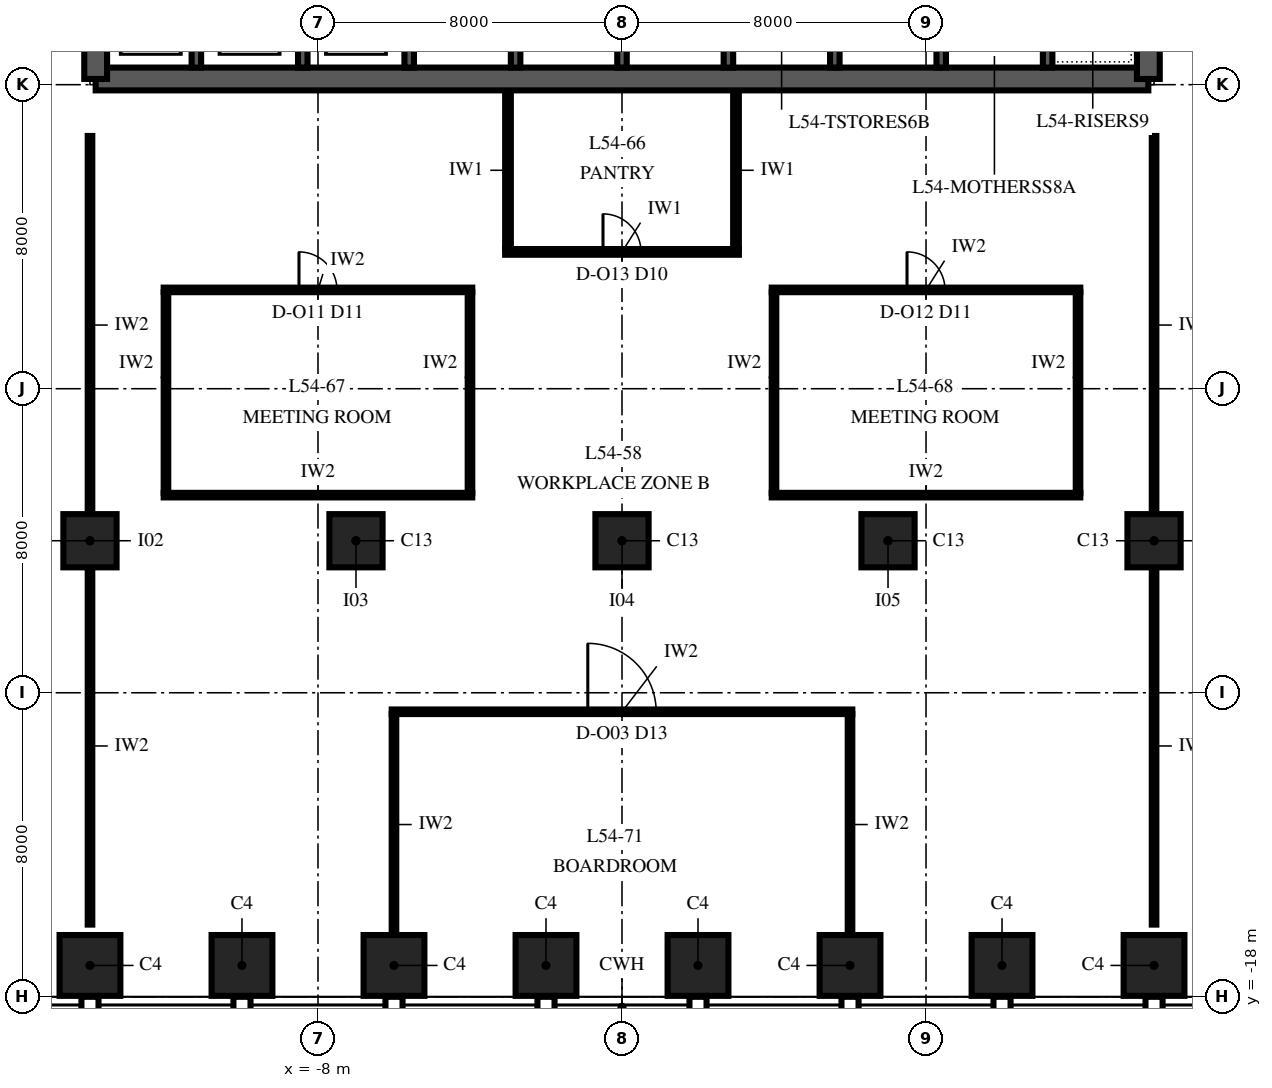
"""IFC4 building model, lengths in metres.
Left out: names, types, materials, properties, quantities, classifications, styles, units other than length and angle.
Written with IfcOpenShell. Run it as: python <this file> out.ifc"""

import sys

from ifc_helpers import new_model, si_unit, direction, frame, frame_2d, origin, origin_2d, place, context, subcontext, project, spatial, polyline, rectangle, outline, extrude, element, fill, save


model = new_model("IFC4")
c1 = context("Model", 3, precision=1e-05, world=origin(), true_north=direction((0.0, 1.0)))
c2 = subcontext(c1, "Body", "Model", "MODEL_VIEW")
j1 = project(units=[si_unit("LENGTHUNIT", "METRE"), si_unit("PLANEANGLEUNIT", "RADIAN")], contexts=[c1])
p1 = place(None, origin())
s1 = spatial("IfcSite", under=j1, at=p1, CompositionType="ELEMENT")
p2 = place(p1, origin())
s2 = spatial("IfcBuilding", under=s1, at=p2, CompositionType="ELEMENT")
p3 = place(p2, frame((0.0, 0.0, 234.0)))
s3 = spatial("IfcBuildingStorey", under=s2, at=p3, CompositionType="ELEMENT", Elevation=234.0)
for number, where, z_axis, x_axis in (
    (1, (-14.0, -17.175, 0.0), (0.0, 0.0, 1.0), (1.0, 0.0, 0.0)),
    (2, (-10.0, -17.175, 0.0), (0.0, 0.0, 1.0), (1.0, 0.0, 0.0)),
    (3, (-6.0, -17.175, 0.0), (0.0, 0.0, 1.0), (1.0, 0.0, 0.0)),
    (4, (-2.0, -17.175, 0.0), (0.0, 0.0, 1.0), (1.0, 0.0, 0.0)),
    (5, (2.0, -17.175, 0.0), (0.0, 0.0, 1.0), (1.0, 0.0, 0.0)),
    (6, (6.0, -17.175, 0.0), (0.0, 0.0, 1.0), (1.0, 0.0, 0.0)),
    (7, (10.0, -17.175, 0.0), (0.0, 0.0, 1.0), (1.0, 0.0, 0.0)),
    (8, (14.0, -17.175, 0.0), (0.0, 0.0, 1.0), (1.0, 0.0, 0.0)),
):
    element("IfcColumn", number, at=place(p3, frame(where, z_axis=z_axis, x_axis=x_axis)), inside=s3, PredefinedType="COLUMN", context=c2, shape_type="SweptSolid", body=[
        extrude(rectangle(XDim=1.6, YDim=1.6, at=origin_2d()), origin(), (0.0, 0.0, 1.0), 4.0),
    ])
for number, where, z_axis, x_axis in (
    (9, (-14.0, -6.0, 0.0), (0.0, 0.0, 1.0), (1.0, 0.0, 0.0)),
    (10, (-7.0, -6.0, 0.0), (0.0, 0.0, 1.0), (1.0, 0.0, 0.0)),
    (11, (0.0, -6.0, 0.0), (0.0, 0.0, 1.0), (1.0, 0.0, 0.0)),
    (12, (7.0, -6.0, 0.0), (0.0, 0.0, 1.0), (1.0, 0.0, 0.0)),
    (13, (14.0, -6.0, 0.0), (0.0, 0.0, 1.0), (1.0, 0.0, 0.0)),
):
    element("IfcColumn", number, at=place(p3, frame(where, z_axis=z_axis, x_axis=x_axis)), inside=s3, PredefinedType="COLUMN", context=c2, shape_type="SweptSolid", body=[
        extrude(rectangle(XDim=1.4, YDim=1.4, at=origin_2d()), origin(), (0.0, 0.0, 1.0), 4.0),
    ])
p4 = place(p3, frame((-13.85, 6.15, 0.0), z_axis=(0.0, 0.0, 1.0), x_axis=(1.0, 0.0, 0.0)))
e14 = element("IfcWall", 14, at=p4, inside=s3, PredefinedType="SHEAR", context=c2, shape_type="SweptSolid", body=[
    extrude(rectangle(XDim=27.7, YDim=0.6, at=frame_2d((13.85, 0.0))), origin(), (0.0, 0.0, 1.0), 4.0),
])
p5 = place(p3, frame((13.85, 6.15, 0.0), z_axis=(0.0, 0.0, 1.0), x_axis=(0.0, 1.0, 0.0)))
e15 = element("IfcWall", 15, at=p5, inside=s3, PredefinedType="SHEAR", context=c2, shape_type="SweptSolid", body=[
    extrude(outline(polyline([(0.0, -0.3), (17.7, -0.3), (17.7, 0.0), (17.4, 0.0), (17.4, 0.3), (0.3, 0.3), (0.3, 0.0), (0.0, 0.0), (0.0, -0.3)])), origin(), (0.0, 0.0, 1.0), 4.0),
])
p6 = place(p5, frame((4.15, 0.0, 0.0)))
e16 = element("IfcOpeningElement", 16, at=p6, cuts=e15, PredefinedType="OPENING", context=c2, shape_type="SweptSolid", body=[
    extrude(rectangle(XDim=1.8, YDim=2.4, at=frame_2d((0.9, 1.2))), frame((0.0, 0.315, 0.0), z_axis=(0.0, -1.0, 0.0), x_axis=(1.0, 0.0, 0.0)), (0.0, 0.0, 1.0), 0.63),
])
p7 = place(p3, frame((-13.85, 23.85, 0.0), z_axis=(0.0, 0.0, 1.0), x_axis=(0.0, -1.0, 0.0)))
e17 = element("IfcWall", 17, at=p7, inside=s3, PredefinedType="SHEAR", context=c2, shape_type="SweptSolid", body=[
    extrude(outline(polyline([(0.0, -0.3), (17.7, -0.3), (17.7, 0.0), (17.4, 0.0), (17.4, 0.3), (0.3, 0.3), (0.3, 0.0), (0.0, 0.0), (0.0, -0.3)])), origin(), (0.0, 0.0, 1.0), 4.0),
])
p8 = place(p7, frame((11.75, 0.0, 0.0)))
e18 = element("IfcOpeningElement", 18, at=p8, cuts=e17, PredefinedType="OPENING", context=c2, shape_type="SweptSolid", body=[
    extrude(rectangle(XDim=1.8, YDim=2.4, at=frame_2d((0.9, 1.2))), frame((0.0, 0.315, 0.0), z_axis=(0.0, -1.0, 0.0), x_axis=(1.0, 0.0, 0.0)), (0.0, 0.0, 1.0), 0.63),
])
for number, where, z_axis, x_axis in (
    (19, (-11.2, 6.45, 0.0), (0.0, 0.0, 1.0), (0.0, 1.0, 0.0)),
    (20, (-8.4, 6.45, 0.0), (0.0, 0.0, 1.0), (0.0, 1.0, 0.0)),
    (21, (-5.6, 6.45, 0.0), (0.0, 0.0, 1.0), (0.0, 1.0, 0.0)),
    (22, (-2.8, 6.45, 0.0), (0.0, 0.0, 1.0), (0.0, 1.0, 0.0)),
    (23, (0.0, 6.45, 0.0), (0.0, 0.0, 1.0), (0.0, 1.0, 0.0)),
    (24, (2.8, 6.45, 0.0), (0.0, 0.0, 1.0), (0.0, 1.0, 0.0)),
    (25, (5.6, 6.45, 0.0), (0.0, 0.0, 1.0), (0.0, 1.0, 0.0)),
    (26, (8.4, 6.45, 0.0), (0.0, 0.0, 1.0), (0.0, 1.0, 0.0)),
    (27, (11.2, 6.45, 0.0), (0.0, 0.0, 1.0), (0.0, 1.0, 0.0)),
):
    element("IfcWall", number, at=place(p3, frame(where, z_axis=z_axis, x_axis=x_axis)), inside=s3, PredefinedType="SHEAR", context=c2, shape_type="SweptSolid", body=[
        extrude(rectangle(XDim=2.825, YDim=0.25, at=frame_2d((1.413, 0.0))), origin(), (0.0, 0.0, 1.0), 4.0),
    ])
p9 = place(p3, frame((-6.06, -10.5, 0.0), z_axis=(0.0, 0.0, 1.0), x_axis=(1.0, 0.0, 0.0)))
e28 = element("IfcWall", 28, at=p9, inside=s3, PredefinedType="PARTITIONING", context=c2, shape_type="SweptSolid", body=[
    extrude(rectangle(XDim=12.12, YDim=0.12, at=frame_2d((6.06, 0.0))), origin(), (0.0, 0.0, 1.0), 3.25),
])
p10 = place(p9, frame((5.16, 0.0, 0.0)))
e29 = element("IfcOpeningElement", 29, at=p10, cuts=e28, PredefinedType="OPENING", context=c2, shape_type="SweptSolid", body=[
    extrude(rectangle(XDim=1.8, YDim=2.4, at=frame_2d((0.9, 1.2))), frame((0.0, 0.075, 0.0), z_axis=(0.0, -1.0, 0.0), x_axis=(1.0, 0.0, 0.0)), (0.0, 0.0, 1.0), 0.15),
])
for number, where, z_axis, x_axis in (
    (30, (-12.06, -4.8, 0.0), (0.0, 0.0, 1.0), (1.0, 0.0, 0.0)),
    (31, (3.94, -4.8, 0.0), (0.0, 0.0, 1.0), (1.0, 0.0, 0.0)),
):
    element("IfcWall", number, at=place(p3, frame(where, z_axis=z_axis, x_axis=x_axis)), inside=s3, PredefinedType="PARTITIONING", context=c2, shape_type="SweptSolid", body=[
        extrude(rectangle(XDim=8.12, YDim=0.12, at=frame_2d((4.06, 0.0))), origin(), (0.0, 0.0, 1.0), 3.25),
    ])
p11 = place(p3, frame((-12.06, 0.6, 0.0), z_axis=(0.0, 0.0, 1.0), x_axis=(1.0, 0.0, 0.0)))
e32 = element("IfcWall", 32, at=p11, inside=s3, PredefinedType="PARTITIONING", context=c2, shape_type="SweptSolid", body=[
    extrude(rectangle(XDim=8.12, YDim=0.12, at=frame_2d((4.06, 0.0))), origin(), (0.0, 0.0, 1.0), 3.25),
])
p12 = place(p11, frame((3.56, 0.0, 0.0)))
e33 = element("IfcOpeningElement", 33, at=p12, cuts=e32, PredefinedType="OPENING", context=c2, shape_type="SweptSolid", body=[
    extrude(rectangle(XDim=1.0, YDim=2.4, at=frame_2d((0.5, 1.2))), frame((0.0, 0.075, 0.0), z_axis=(0.0, -1.0, 0.0), x_axis=(1.0, 0.0, 0.0)), (0.0, 0.0, 1.0), 0.15),
])
p13 = place(p3, frame((3.94, 0.6, 0.0), z_axis=(0.0, 0.0, 1.0), x_axis=(1.0, 0.0, 0.0)))
e34 = element("IfcWall", 34, at=p13, inside=s3, PredefinedType="PARTITIONING", context=c2, shape_type="SweptSolid", body=[
    extrude(rectangle(XDim=8.12, YDim=0.12, at=frame_2d((4.06, 0.0))), origin(), (0.0, 0.0, 1.0), 3.25),
])
p14 = place(p13, frame((3.56, 0.0, 0.0)))
e35 = element("IfcOpeningElement", 35, at=p14, cuts=e34, PredefinedType="OPENING", context=c2, shape_type="SweptSolid", body=[
    extrude(rectangle(XDim=1.0, YDim=2.4, at=frame_2d((0.5, 1.2))), frame((0.0, 0.075, 0.0), z_axis=(0.0, -1.0, 0.0), x_axis=(1.0, 0.0, 0.0)), (0.0, 0.0, 1.0), 0.15),
])
p15 = place(p3, frame((-3.075, 1.6, 0.0), z_axis=(0.0, 0.0, 1.0), x_axis=(1.0, 0.0, 0.0)))
e36 = element("IfcWall", 36, at=p15, inside=s3, PredefinedType="PARTITIONING", context=c2, shape_type="SweptSolid", body=[
    extrude(rectangle(XDim=6.15, YDim=0.15, at=frame_2d((3.075, 0.0))), origin(), (0.0, 0.0, 1.0), 3.25),
])
p16 = place(p15, frame((2.575, 0.0, 0.0)))
e37 = element("IfcOpeningElement", 37, at=p16, cuts=e36, PredefinedType="OPENING", context=c2, shape_type="SweptSolid", body=[
    extrude(rectangle(XDim=1.0, YDim=2.3, at=frame_2d((0.5, 1.15))), frame((0.0, 0.09, 0.0), z_axis=(0.0, -1.0, 0.0), x_axis=(1.0, 0.0, 0.0)), (0.0, 0.0, 1.0), 0.18),
])
p17 = place(p3, frame((-12.0, -4.74, 0.0), z_axis=(0.0, 0.0, 1.0), x_axis=(0.0, 1.0, 0.0)))
e38 = element("IfcWall", 38, at=p17, inside=s3, PredefinedType="PARTITIONING", context=c2, shape_type="SweptSolid", body=[
    extrude(rectangle(XDim=5.28, YDim=0.12, at=frame_2d((2.64, 0.0))), origin(), (0.0, 0.0, 1.0), 3.85),
])
p18 = place(p3, frame((-6.0, -16.375, 0.0), z_axis=(0.0, 0.0, 1.0), x_axis=(0.0, 1.0, 0.0)))
e39 = element("IfcWall", 39, at=p18, inside=s3, PredefinedType="PARTITIONING", context=c2, shape_type="SweptSolid", body=[
    extrude(rectangle(XDim=5.815, YDim=0.12, at=frame_2d((2.907, 0.0))), origin(), (0.0, 0.0, 1.0), 3.25),
])
p19 = place(p3, frame((-4.0, -4.74, 0.0), z_axis=(0.0, 0.0, 1.0), x_axis=(0.0, 1.0, 0.0)))
e40 = element("IfcWall", 40, at=p19, inside=s3, PredefinedType="PARTITIONING", context=c2, shape_type="SweptSolid", body=[
    extrude(rectangle(XDim=5.28, YDim=0.12, at=frame_2d((2.64, 0.0))), origin(), (0.0, 0.0, 1.0), 3.85),
])
for number, where, z_axis, x_axis in (
    (41, (-3.0, 1.675, 0.0), (0.0, 0.0, 1.0), (0.0, 1.0, 0.0)),
    (42, (3.0, 1.675, 0.0), (0.0, 0.0, 1.0), (0.0, 1.0, 0.0)),
):
    element("IfcWall", number, at=place(p3, frame(where, z_axis=z_axis, x_axis=x_axis)), inside=s3, PredefinedType="PARTITIONING", context=c2, shape_type="SweptSolid", body=[
        extrude(rectangle(XDim=4.145, YDim=0.15, at=frame_2d((2.073, 0.0))), origin(), (0.0, 0.0, 1.0), 3.85),
    ])
p20 = place(p3, frame((4.0, -4.74, 0.0), z_axis=(0.0, 0.0, 1.0), x_axis=(0.0, 1.0, 0.0)))
e43 = element("IfcWall", 43, at=p20, inside=s3, PredefinedType="PARTITIONING", context=c2, shape_type="SweptSolid", body=[
    extrude(rectangle(XDim=5.28, YDim=0.12, at=frame_2d((2.64, 0.0))), origin(), (0.0, 0.0, 1.0), 3.85),
])
p21 = place(p3, frame((6.0, -16.375, 0.0), z_axis=(0.0, 0.0, 1.0), x_axis=(0.0, 1.0, 0.0)))
e44 = element("IfcWall", 44, at=p21, inside=s3, PredefinedType="PARTITIONING", context=c2, shape_type="SweptSolid", body=[
    extrude(rectangle(XDim=5.815, YDim=0.12, at=frame_2d((2.907, 0.0))), origin(), (0.0, 0.0, 1.0), 3.25),
])
p22 = place(p3, frame((12.0, -4.74, 0.0), z_axis=(0.0, 0.0, 1.0), x_axis=(0.0, 1.0, 0.0)))
e45 = element("IfcWall", 45, at=p22, inside=s3, PredefinedType="PARTITIONING", context=c2, shape_type="SweptSolid", body=[
    extrude(rectangle(XDim=5.28, YDim=0.12, at=frame_2d((2.64, 0.0))), origin(), (0.0, 0.0, 1.0), 3.85),
])
p23 = place(p3, frame((-13.999, -16.1, 0.0), z_axis=(0.0, 0.0, 1.0), x_axis=(0.0, 1.0, 0.0)))
e46 = element("IfcWall", 46, at=p23, inside=s3, PredefinedType="PARTITIONING", context=c2, shape_type="SweptSolid", body=[
    extrude(rectangle(XDim=9.4, YDim=0.12, at=frame_2d((4.7, 0.0))), origin(), (0.0, 0.0, 1.0), 3.25),
])
p24 = place(p3, frame((-13.999, -5.3, 0.0), z_axis=(0.0, 0.0, 1.0), x_axis=(0.0, 1.0, 0.0)))
e47 = element("IfcWall", 47, at=p24, inside=s3, PredefinedType="PARTITIONING", context=c2, shape_type="SweptSolid", body=[
    extrude(rectangle(XDim=9.95, YDim=0.12, at=frame_2d((4.975, 0.0))), origin(), (0.0, 0.0, 1.0), 3.25),
])
p25 = place(p3, frame((14.001, -16.1, 0.0), z_axis=(0.0, 0.0, 1.0), x_axis=(0.0, 1.0, 0.0)))
e48 = element("IfcWall", 48, at=p25, inside=s3, PredefinedType="PARTITIONING", context=c2, shape_type="SweptSolid", body=[
    extrude(rectangle(XDim=9.4, YDim=0.12, at=frame_2d((4.7, 0.0))), origin(), (0.0, 0.0, 1.0), 3.25),
])
p26 = place(p3, frame((14.001, -5.3, 0.0), z_axis=(0.0, 0.0, 1.0), x_axis=(0.0, 1.0, 0.0)))
e49 = element("IfcWall", 49, at=p26, inside=s3, PredefinedType="PARTITIONING", context=c2, shape_type="SweptSolid", body=[
    extrude(rectangle(XDim=9.95, YDim=0.12, at=frame_2d((4.975, 0.0))), origin(), (0.0, 0.0, 1.0), 3.25),
])
p27 = place(p10, origin())
e50 = element("IfcDoor", 50, at=p27, inside=s3, OperationType="DOUBLE_DOOR_SINGLE_SWING", PredefinedType="DOOR", context=c2, shape_type="SweptSolid", body=[
    extrude(rectangle(XDim=1.8, YDim=2.4, at=frame_2d((0.9, 1.2))), frame((0.0, 0.06, 0.0), z_axis=(0.0, -1.0, 0.0), x_axis=(1.0, 0.0, 0.0)), (0.0, 0.0, 1.0), 0.12),
])
fill(e29, e50)
p28 = place(p12, origin())
e51 = element("IfcDoor", 51, at=p28, inside=s3, OperationType="SINGLE_SWING_RIGHT", PredefinedType="DOOR", context=c2, shape_type="SweptSolid", body=[
    extrude(rectangle(XDim=1.0, YDim=2.4, at=frame_2d((0.5, 1.2))), frame((0.0, 0.06, 0.0), z_axis=(0.0, -1.0, 0.0), x_axis=(1.0, 0.0, 0.0)), (0.0, 0.0, 1.0), 0.12),
])
fill(e33, e51)
p29 = place(p14, origin())
e52 = element("IfcDoor", 52, at=p29, inside=s3, OperationType="SINGLE_SWING_RIGHT", PredefinedType="DOOR", context=c2, shape_type="SweptSolid", body=[
    extrude(rectangle(XDim=1.0, YDim=2.4, at=frame_2d((0.5, 1.2))), frame((0.0, 0.06, 0.0), z_axis=(0.0, -1.0, 0.0), x_axis=(1.0, 0.0, 0.0)), (0.0, 0.0, 1.0), 0.12),
])
fill(e35, e52)
p30 = place(p16, origin())
e53 = element("IfcDoor", 53, at=p30, inside=s3, OperationType="SINGLE_SWING_LEFT", PredefinedType="DOOR", context=c2, shape_type="SweptSolid", body=[
    extrude(rectangle(XDim=1.0, YDim=2.3, at=frame_2d((0.5, 1.15))), frame((0.0, 0.075, 0.0), z_axis=(0.0, -1.0, 0.0), x_axis=(1.0, 0.0, 0.0)), (0.0, 0.0, 1.0), 0.149),
])
fill(e37, e53)
save(model, sys.argv[1])
